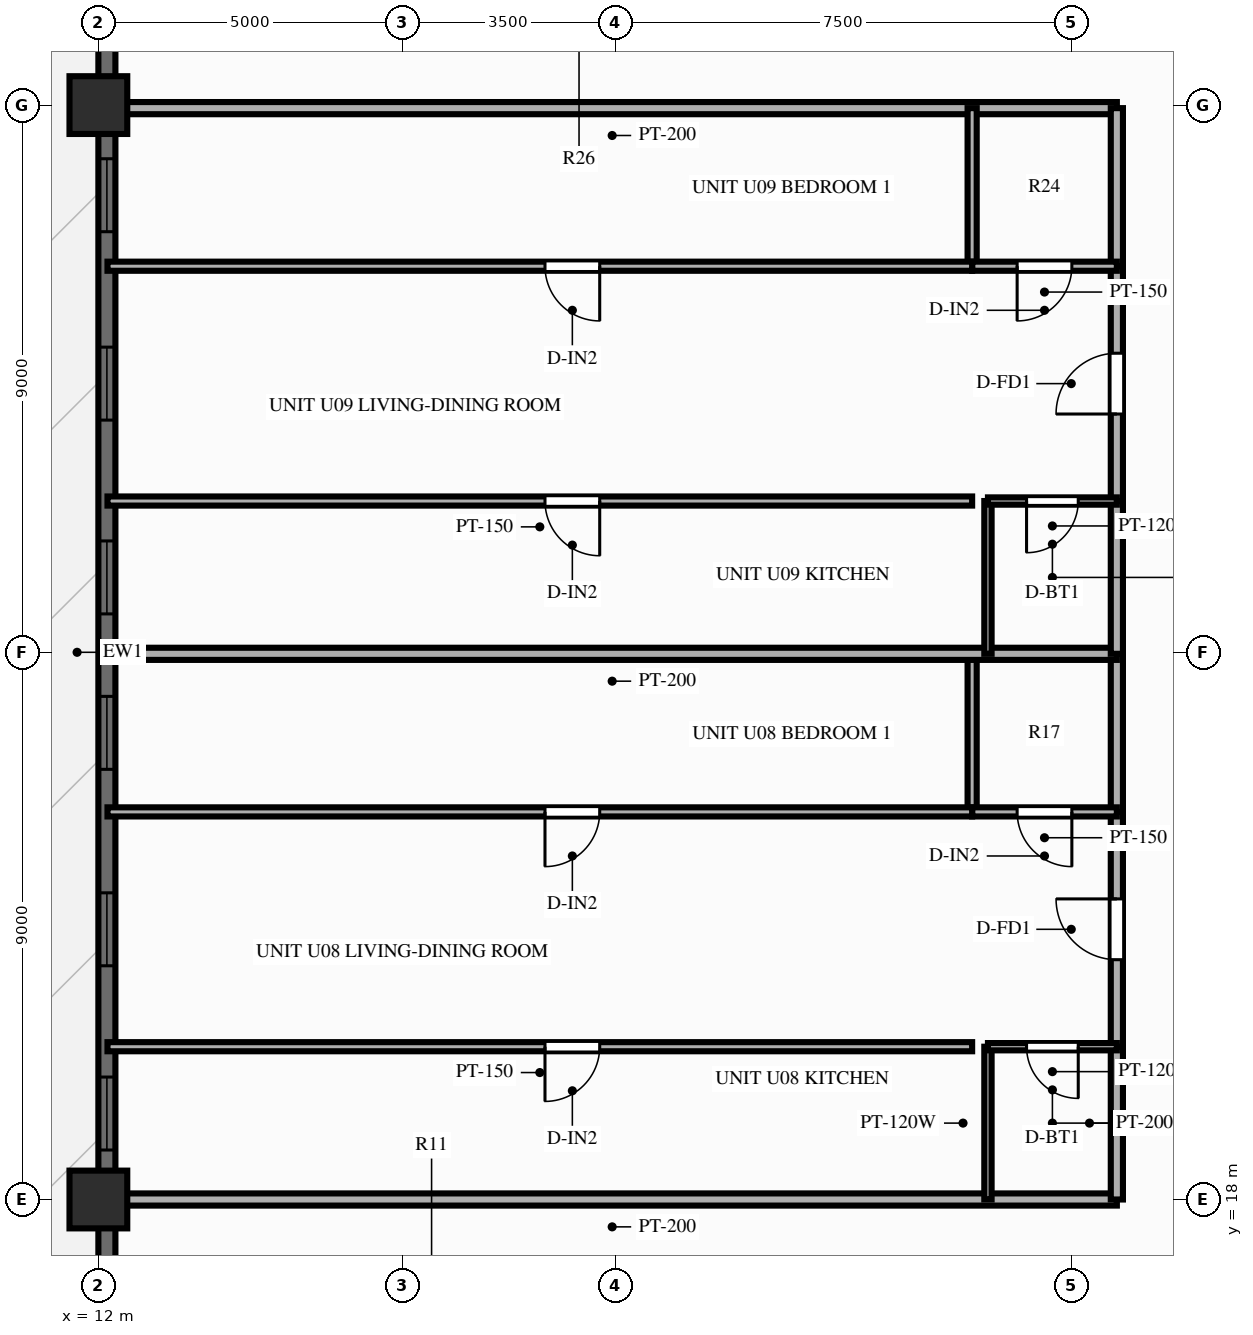
"""IFC4 building model, lengths in metres.
Left out: names, types, materials, properties, quantities, classifications, styles, units other than length and angle.
Written with IfcOpenShell. Run it as: python <this file> out.ifc"""

import sys

from ifc_helpers import new_model, si_unit, direction, frame, frame_2d, origin, origin_2d, place, context, subcontext, project, spatial, rectangle, extrude, source, transform, mapped, element, fill, save


model = new_model("IFC4")
c1 = context("Model", 3, precision=1e-05, world=origin(), true_north=direction((0.0, 1.0)))
c2 = subcontext(c1, "Body", "Model", "MODEL_VIEW")
j1 = project(units=[si_unit("LENGTHUNIT", "METRE"), si_unit("PLANEANGLEUNIT", "RADIAN")], contexts=[c1])
p1 = place(None, origin())
s1 = spatial("IfcSite", under=j1, at=p1, CompositionType="ELEMENT")
p2 = place(p1, origin())
s2 = spatial("IfcBuilding", under=s1, at=p2, CompositionType="ELEMENT")
p3 = place(p2, frame((0.0, 0.0, 77.85)))
s3 = spatial("IfcBuildingStorey", under=s2, at=p3, CompositionType="ELEMENT", Elevation=77.85)
m1 = source(origin(), c2, "Body", "SweptSolid", [
    extrude(rectangle(XDim=0.95, YDim=0.95, at=origin_2d()), origin(), (0.0, 0.0, 1.0), 3.0),
])
for number, where, z_axis, x_axis in (
    (1, (12.0, 36.0, 0.0), (0.0, 0.0, 1.0), (1.0, 0.0, 0.0)),
    (2, (12.0, 18.0, 0.0), (0.0, 0.0, 1.0), (1.0, 0.0, 0.0)),
):
    element("IfcColumn", number, at=place(p3, frame(where, z_axis=z_axis, x_axis=x_axis)), inside=s3, PredefinedType="COLUMN", context=c2, shape_type="MappedRepresentation", body=[
        mapped(m1, transform((0.0, 0.0, 0.0), scale=1.0)),
    ])
p4 = place(p3, frame((12.14, 7.2, 0.0), z_axis=(0.0, 0.0, 1.0), x_axis=(0.0, 1.0, 0.0)))
e3 = element("IfcWall", 3, at=p4, inside=s3, PredefinedType="SOLIDWALL", context=c2, shape_type="SweptSolid", body=[
    extrude(rectangle(XDim=39.6, YDim=0.28, at=frame_2d((19.8, 0.0))), origin(), (0.0, 0.0, 1.0), 2.28),
])
p5 = place(p4, frame((4.6, 0.0, 0.0)))
e4 = element("IfcOpeningElement", 4, at=p5, cuts=e3, PredefinedType="OPENING", context=c2, shape_type="SweptSolid", body=[
    extrude(rectangle(XDim=1.6, YDim=2.15, at=frame_2d((0.8, 1.075))), frame((0.0, 0.152, 0.0), z_axis=(0.0, -1.0, 0.0), x_axis=(1.0, 0.0, 0.0)), (0.0, 0.0, 1.0), 0.304),
])
p6 = place(p4, frame((11.614, 0.0, 0.25)))
e5 = element("IfcOpeningElement", 5, at=p6, cuts=e3, PredefinedType="OPENING", context=c2, shape_type="SweptSolid", body=[
    extrude(rectangle(XDim=1.2, YDim=1.5, at=frame_2d((0.6, 0.75))), frame((0.0, 0.152, 0.0), z_axis=(0.0, -1.0, 0.0), x_axis=(1.0, 0.0, 0.0)), (0.0, 0.0, 1.0), 0.304),
])
p7 = place(p4, frame((14.644, 0.0, 0.25)))
e6 = element("IfcOpeningElement", 6, at=p7, cuts=e3, PredefinedType="OPENING", context=c2, shape_type="SweptSolid", body=[
    extrude(rectangle(XDim=1.2, YDim=1.5, at=frame_2d((0.6, 0.75))), frame((0.0, 0.152, 0.0), z_axis=(0.0, -1.0, 0.0), x_axis=(1.0, 0.0, 0.0)), (0.0, 0.0, 1.0), 0.304),
])
p8 = place(p4, frame((17.875, 0.0, 0.25)))
e7 = element("IfcOpeningElement", 7, at=p8, cuts=e3, PredefinedType="OPENING", context=c2, shape_type="SweptSolid", body=[
    extrude(rectangle(XDim=1.2, YDim=1.5, at=frame_2d((0.6, 0.75))), frame((0.0, 0.152, 0.0), z_axis=(0.0, -1.0, 0.0), x_axis=(1.0, 0.0, 0.0)), (0.0, 0.0, 1.0), 0.304),
])
p9 = place(p4, frame((20.431, 0.0, 0.25)))
e8 = element("IfcOpeningElement", 8, at=p9, cuts=e3, PredefinedType="OPENING", context=c2, shape_type="SweptSolid", body=[
    extrude(rectangle(XDim=1.2, YDim=1.5, at=frame_2d((0.6, 0.75))), frame((0.0, 0.152, 0.0), z_axis=(0.0, -1.0, 0.0), x_axis=(1.0, 0.0, 0.0)), (0.0, 0.0, 1.0), 0.304),
])
p10 = place(p4, frame((23.619, 0.0, 0.25)))
e9 = element("IfcOpeningElement", 9, at=p10, cuts=e3, PredefinedType="OPENING", context=c2, shape_type="SweptSolid", body=[
    extrude(rectangle(XDim=1.2, YDim=1.5, at=frame_2d((0.6, 0.75))), frame((0.0, 0.152, 0.0), z_axis=(0.0, -1.0, 0.0), x_axis=(1.0, 0.0, 0.0)), (0.0, 0.0, 1.0), 0.304),
])
p11 = place(p4, frame((26.718, 0.0, 0.25)))
e10 = element("IfcOpeningElement", 10, at=p11, cuts=e3, PredefinedType="OPENING", context=c2, shape_type="SweptSolid", body=[
    extrude(rectangle(XDim=1.2, YDim=1.5, at=frame_2d((0.6, 0.75))), frame((0.0, 0.152, 0.0), z_axis=(0.0, -1.0, 0.0), x_axis=(1.0, 0.0, 0.0)), (0.0, 0.0, 1.0), 0.304),
])
p12 = place(p4, frame((33.6, 0.0, 0.25)))
e11 = element("IfcOpeningElement", 11, at=p12, cuts=e3, PredefinedType="OPENING", context=c2, shape_type="SweptSolid", body=[
    extrude(rectangle(XDim=1.2, YDim=1.5, at=frame_2d((0.6, 0.75))), frame((0.0, 0.152, 0.0), z_axis=(0.0, -1.0, 0.0), x_axis=(1.0, 0.0, 0.0)), (0.0, 0.0, 1.0), 0.304),
])
for number, where, z_axis, x_axis in (
    (12, (28.75, 18.0, 0.0), (0.0, 0.0, 1.0), (-1.0, 0.0, 0.0)),
    (13, (28.75, 35.95, 0.0), (0.0, 0.0, 1.0), (-1.0, 0.0, 0.0)),
):
    element("IfcWall", number, at=place(p3, frame(where, z_axis=z_axis, x_axis=x_axis)), inside=s3, PredefinedType="PARTITIONING", context=c2, shape_type="SweptSolid", body=[
        extrude(rectangle(XDim=16.6, YDim=0.2, at=frame_2d((8.3, 0.0))), origin(), (0.0, 0.0, 1.0), 2.34),
    ])
p13 = place(p3, frame((28.75, 18.0, 0.0), z_axis=(0.0, 0.0, 1.0), x_axis=(0.0, 1.0, 0.0)))
e14 = element("IfcWall", 14, at=p13, inside=s3, PredefinedType="PARTITIONING", context=c2, shape_type="SweptSolid", body=[
    extrude(rectangle(XDim=2.513, YDim=0.2, at=frame_2d((1.256, 0.0))), origin(), (0.0, 0.0, 1.0), 2.79),
])
p14 = place(p3, frame((28.75, 20.513, 0.0), z_axis=(0.0, 0.0, 1.0), x_axis=(0.0, 1.0, 0.0)))
e15 = element("IfcWall", 15, at=p14, inside=s3, PredefinedType="PARTITIONING", context=c2, shape_type="SweptSolid", body=[
    extrude(rectangle(XDim=3.862, YDim=0.2, at=frame_2d((1.931, 0.0))), origin(), (0.0, 0.0, 1.0), 2.79),
])
p15 = place(p14, frame((1.431, 0.0, 0.0)))
e16 = element("IfcOpeningElement", 16, at=p15, cuts=e15, PredefinedType="OPENING", context=c2, shape_type="SweptSolid", body=[
    extrude(rectangle(XDim=1.0, YDim=2.15, at=frame_2d((0.5, 1.075))), frame((0.0, 0.112, 0.0), z_axis=(0.0, -1.0, 0.0), x_axis=(1.0, 0.0, 0.0)), (0.0, 0.0, 1.0), 0.224),
])
p16 = place(p3, frame((28.75, 24.375, 0.0), z_axis=(0.0, 0.0, 1.0), x_axis=(0.0, 1.0, 0.0)))
e17 = element("IfcWall", 17, at=p16, inside=s3, PredefinedType="PARTITIONING", context=c2, shape_type="SweptSolid", body=[
    extrude(rectangle(XDim=2.6, YDim=0.2, at=frame_2d((1.3, 0.0))), origin(), (0.0, 0.0, 1.0), 2.79),
])
p17 = place(p3, frame((26.63, 18.0, 0.0), z_axis=(0.0, 0.0, 1.0), x_axis=(0.0, 1.0, 0.0)))
e18 = element("IfcWall", 18, at=p17, inside=s3, PredefinedType="PARTITIONING", context=c2, shape_type="SweptSolid", body=[
    extrude(rectangle(XDim=2.513, YDim=0.12, at=frame_2d((1.256, 0.0))), origin(), (0.0, 0.0, 1.0), 2.79),
])
p18 = place(p3, frame((26.37, 24.375, 0.0), z_axis=(0.0, 0.0, 1.0), x_axis=(0.0, 1.0, 0.0)))
e19 = element("IfcWall", 19, at=p18, inside=s3, PredefinedType="PARTITIONING", context=c2, shape_type="SweptSolid", body=[
    extrude(rectangle(XDim=2.6, YDim=0.15, at=frame_2d((1.3, 0.0))), origin(), (0.0, 0.0, 1.0), 2.79),
])
p19 = place(p3, frame((28.75, 20.513, 0.0), z_axis=(0.0, 0.0, 1.0), x_axis=(-1.0, 0.0, 0.0)))
e20 = element("IfcWall", 20, at=p19, inside=s3, PredefinedType="PARTITIONING", context=c2, shape_type="SweptSolid", body=[
    extrude(rectangle(XDim=2.12, YDim=0.12, at=frame_2d((1.06, 0.0))), origin(), (0.0, 0.0, 1.0), 2.79),
])
p20 = place(p19, frame((0.635, 0.0, 0.0)))
e21 = element("IfcOpeningElement", 21, at=p20, cuts=e20, PredefinedType="OPENING", context=c2, shape_type="SweptSolid", body=[
    extrude(rectangle(XDim=0.85, YDim=2.05, at=frame_2d((0.425, 1.025))), frame((0.0, 0.072, 0.0), z_axis=(0.0, -1.0, 0.0), x_axis=(1.0, 0.0, 0.0)), (0.0, 0.0, 1.0), 0.144),
])
p21 = place(p3, frame((26.37, 20.513, 0.0), z_axis=(0.0, 0.0, 1.0), x_axis=(-1.0, 0.0, 0.0)))
e22 = element("IfcWall", 22, at=p21, inside=s3, PredefinedType="PARTITIONING", context=c2, shape_type="SweptSolid", body=[
    extrude(rectangle(XDim=14.22, YDim=0.15, at=frame_2d((7.11, 0.0))), origin(), (0.0, 0.0, 1.0), 2.79),
])
p22 = place(p21, frame((6.125, 0.0, 0.0)))
e23 = element("IfcOpeningElement", 23, at=p22, cuts=e22, PredefinedType="OPENING", context=c2, shape_type="SweptSolid", body=[
    extrude(rectangle(XDim=0.9, YDim=2.1, at=frame_2d((0.45, 1.05))), frame((0.0, 0.087, 0.0), z_axis=(0.0, -1.0, 0.0), x_axis=(1.0, 0.0, 0.0)), (0.0, 0.0, 1.0), 0.174),
])
p23 = place(p3, frame((28.75, 24.375, 0.0), z_axis=(0.0, 0.0, 1.0), x_axis=(-1.0, 0.0, 0.0)))
e24 = element("IfcWall", 24, at=p23, inside=s3, PredefinedType="PARTITIONING", context=c2, shape_type="SweptSolid", body=[
    extrude(rectangle(XDim=2.38, YDim=0.15, at=frame_2d((1.19, 0.0))), origin(), (0.0, 0.0, 1.0), 2.79),
])
p24 = place(p23, frame((0.74, 0.0, 0.0)))
e25 = element("IfcOpeningElement", 25, at=p24, cuts=e24, PredefinedType="OPENING", context=c2, shape_type="SweptSolid", body=[
    extrude(rectangle(XDim=0.9, YDim=2.1, at=frame_2d((0.45, 1.05))), frame((0.0, 0.087, 0.0), z_axis=(0.0, -1.0, 0.0), x_axis=(1.0, 0.0, 0.0)), (0.0, 0.0, 1.0), 0.174),
])
p25 = place(p3, frame((26.37, 24.375, 0.0), z_axis=(0.0, 0.0, 1.0), x_axis=(-1.0, 0.0, 0.0)))
e26 = element("IfcWall", 26, at=p25, inside=s3, PredefinedType="PARTITIONING", context=c2, shape_type="SweptSolid", body=[
    extrude(rectangle(XDim=14.22, YDim=0.15, at=frame_2d((7.11, 0.0))), origin(), (0.0, 0.0, 1.0), 2.79),
])
p26 = place(p25, frame((6.125, 0.0, 0.0)))
e27 = element("IfcOpeningElement", 27, at=p26, cuts=e26, PredefinedType="OPENING", context=c2, shape_type="SweptSolid", body=[
    extrude(rectangle(XDim=0.9, YDim=2.1, at=frame_2d((0.45, 1.05))), frame((0.0, 0.087, 0.0), z_axis=(0.0, -1.0, 0.0), x_axis=(1.0, 0.0, 0.0)), (0.0, 0.0, 1.0), 0.174),
])
p27 = place(p3, frame((28.75, 26.975, 0.0), z_axis=(0.0, 0.0, 1.0), x_axis=(-1.0, 0.0, 0.0)))
e28 = element("IfcWall", 28, at=p27, inside=s3, PredefinedType="PARTITIONING", context=c2, shape_type="SweptSolid", body=[
    extrude(rectangle(XDim=16.6, YDim=0.2, at=frame_2d((8.3, 0.0))), origin(), (0.0, 0.0, 1.0), 2.79),
])
p28 = place(p3, frame((28.75, 26.975, 0.0), z_axis=(0.0, 0.0, 1.0), x_axis=(0.0, 1.0, 0.0)))
e29 = element("IfcWall", 29, at=p28, inside=s3, PredefinedType="PARTITIONING", context=c2, shape_type="SweptSolid", body=[
    extrude(rectangle(XDim=2.513, YDim=0.2, at=frame_2d((1.256, 0.0))), origin(), (0.0, 0.0, 1.0), 2.79),
])
p29 = place(p3, frame((28.75, 29.488, 0.0), z_axis=(0.0, 0.0, 1.0), x_axis=(0.0, 1.0, 0.0)))
e30 = element("IfcWall", 30, at=p29, inside=s3, PredefinedType="PARTITIONING", context=c2, shape_type="SweptSolid", body=[
    extrude(rectangle(XDim=3.862, YDim=0.2, at=frame_2d((1.931, 0.0))), origin(), (0.0, 0.0, 1.0), 2.79),
])
p30 = place(p29, frame((1.431, 0.0, 0.0)))
e31 = element("IfcOpeningElement", 31, at=p30, cuts=e30, PredefinedType="OPENING", context=c2, shape_type="SweptSolid", body=[
    extrude(rectangle(XDim=1.0, YDim=2.15, at=frame_2d((0.5, 1.075))), frame((0.0, 0.112, 0.0), z_axis=(0.0, -1.0, 0.0), x_axis=(1.0, 0.0, 0.0)), (0.0, 0.0, 1.0), 0.224),
])
p31 = place(p3, frame((28.75, 33.35, 0.0), z_axis=(0.0, 0.0, 1.0), x_axis=(0.0, 1.0, 0.0)))
e32 = element("IfcWall", 32, at=p31, inside=s3, PredefinedType="PARTITIONING", context=c2, shape_type="SweptSolid", body=[
    extrude(rectangle(XDim=2.6, YDim=0.2, at=frame_2d((1.3, 0.0))), origin(), (0.0, 0.0, 1.0), 2.79),
])
p32 = place(p3, frame((26.63, 26.975, 0.0), z_axis=(0.0, 0.0, 1.0), x_axis=(0.0, 1.0, 0.0)))
e33 = element("IfcWall", 33, at=p32, inside=s3, PredefinedType="PARTITIONING", context=c2, shape_type="SweptSolid", body=[
    extrude(rectangle(XDim=2.513, YDim=0.12, at=frame_2d((1.256, 0.0))), origin(), (0.0, 0.0, 1.0), 2.79),
])
p33 = place(p3, frame((26.37, 33.35, 0.0), z_axis=(0.0, 0.0, 1.0), x_axis=(0.0, 1.0, 0.0)))
e34 = element("IfcWall", 34, at=p33, inside=s3, PredefinedType="PARTITIONING", context=c2, shape_type="SweptSolid", body=[
    extrude(rectangle(XDim=2.6, YDim=0.15, at=frame_2d((1.3, 0.0))), origin(), (0.0, 0.0, 1.0), 2.79),
])
p34 = place(p3, frame((28.75, 29.488, 0.0), z_axis=(0.0, 0.0, 1.0), x_axis=(-1.0, 0.0, 0.0)))
e35 = element("IfcWall", 35, at=p34, inside=s3, PredefinedType="PARTITIONING", context=c2, shape_type="SweptSolid", body=[
    extrude(rectangle(XDim=2.12, YDim=0.12, at=frame_2d((1.06, 0.0))), origin(), (0.0, 0.0, 1.0), 2.79),
])
p35 = place(p34, frame((0.635, 0.0, 0.0)))
e36 = element("IfcOpeningElement", 36, at=p35, cuts=e35, PredefinedType="OPENING", context=c2, shape_type="SweptSolid", body=[
    extrude(rectangle(XDim=0.85, YDim=2.05, at=frame_2d((0.425, 1.025))), frame((0.0, 0.072, 0.0), z_axis=(0.0, -1.0, 0.0), x_axis=(1.0, 0.0, 0.0)), (0.0, 0.0, 1.0), 0.144),
])
p36 = place(p3, frame((26.37, 29.488, 0.0), z_axis=(0.0, 0.0, 1.0), x_axis=(-1.0, 0.0, 0.0)))
e37 = element("IfcWall", 37, at=p36, inside=s3, PredefinedType="PARTITIONING", context=c2, shape_type="SweptSolid", body=[
    extrude(rectangle(XDim=14.22, YDim=0.15, at=frame_2d((7.11, 0.0))), origin(), (0.0, 0.0, 1.0), 2.79),
])
p37 = place(p36, frame((6.125, 0.0, 0.0)))
e38 = element("IfcOpeningElement", 38, at=p37, cuts=e37, PredefinedType="OPENING", context=c2, shape_type="SweptSolid", body=[
    extrude(rectangle(XDim=0.9, YDim=2.1, at=frame_2d((0.45, 1.05))), frame((0.0, 0.087, 0.0), z_axis=(0.0, -1.0, 0.0), x_axis=(1.0, 0.0, 0.0)), (0.0, 0.0, 1.0), 0.174),
])
p38 = place(p3, frame((28.75, 33.35, 0.0), z_axis=(0.0, 0.0, 1.0), x_axis=(-1.0, 0.0, 0.0)))
e39 = element("IfcWall", 39, at=p38, inside=s3, PredefinedType="PARTITIONING", context=c2, shape_type="SweptSolid", body=[
    extrude(rectangle(XDim=2.38, YDim=0.15, at=frame_2d((1.19, 0.0))), origin(), (0.0, 0.0, 1.0), 2.79),
])
p39 = place(p38, frame((0.74, 0.0, 0.0)))
e40 = element("IfcOpeningElement", 40, at=p39, cuts=e39, PredefinedType="OPENING", context=c2, shape_type="SweptSolid", body=[
    extrude(rectangle(XDim=0.9, YDim=2.1, at=frame_2d((0.45, 1.05))), frame((0.0, 0.087, 0.0), z_axis=(0.0, -1.0, 0.0), x_axis=(1.0, 0.0, 0.0)), (0.0, 0.0, 1.0), 0.174),
])
p40 = place(p3, frame((26.37, 33.35, 0.0), z_axis=(0.0, 0.0, 1.0), x_axis=(-1.0, 0.0, 0.0)))
e41 = element("IfcWall", 41, at=p40, inside=s3, PredefinedType="PARTITIONING", context=c2, shape_type="SweptSolid", body=[
    extrude(rectangle(XDim=14.22, YDim=0.15, at=frame_2d((7.11, 0.0))), origin(), (0.0, 0.0, 1.0), 2.79),
])
p41 = place(p40, frame((6.125, 0.0, 0.0)))
e42 = element("IfcOpeningElement", 42, at=p41, cuts=e41, PredefinedType="OPENING", context=c2, shape_type="SweptSolid", body=[
    extrude(rectangle(XDim=0.9, YDim=2.1, at=frame_2d((0.45, 1.05))), frame((0.0, 0.087, 0.0), z_axis=(0.0, -1.0, 0.0), x_axis=(1.0, 0.0, 0.0)), (0.0, 0.0, 1.0), 0.174),
])
m2 = source(origin(), c2, "Body", "SweptSolid", [
    extrude(rectangle(XDim=1.2, YDim=1.5, at=frame_2d((0.6, 0.75))), frame((0.0, 0.03, 0.0), z_axis=(0.0, -1.0, 0.0), x_axis=(1.0, 0.0, 0.0)), (0.0, 0.0, 1.0), 0.06),
])
p42 = place(p6, origin())
e43 = element("IfcWindow", 43, at=p42, inside=s3, PartitioningType="SINGLE_PANEL", PredefinedType="WINDOW", context=c2, shape_type="MappedRepresentation", body=[
    mapped(m2, transform((0.0, 0.0, 0.0), scale=1.0)),
])
fill(e5, e43)
p43 = place(p7, origin())
e44 = element("IfcWindow", 44, at=p43, inside=s3, PartitioningType="SINGLE_PANEL", PredefinedType="WINDOW", context=c2, shape_type="MappedRepresentation", body=[
    mapped(m2, transform((0.0, 0.0, 0.0), scale=1.0)),
])
fill(e6, e44)
p44 = place(p8, origin())
e45 = element("IfcWindow", 45, at=p44, inside=s3, PartitioningType="SINGLE_PANEL", PredefinedType="WINDOW", context=c2, shape_type="MappedRepresentation", body=[
    mapped(m2, transform((0.0, 0.0, 0.0), scale=1.0)),
])
fill(e7, e45)
p45 = place(p9, origin())
e46 = element("IfcWindow", 46, at=p45, inside=s3, PartitioningType="SINGLE_PANEL", PredefinedType="WINDOW", context=c2, shape_type="MappedRepresentation", body=[
    mapped(m2, transform((0.0, 0.0, 0.0), scale=1.0)),
])
fill(e8, e46)
p46 = place(p10, origin())
e47 = element("IfcWindow", 47, at=p46, inside=s3, PartitioningType="SINGLE_PANEL", PredefinedType="WINDOW", context=c2, shape_type="MappedRepresentation", body=[
    mapped(m2, transform((0.0, 0.0, 0.0), scale=1.0)),
])
fill(e9, e47)
p47 = place(p11, origin())
e48 = element("IfcWindow", 48, at=p47, inside=s3, PartitioningType="SINGLE_PANEL", PredefinedType="WINDOW", context=c2, shape_type="MappedRepresentation", body=[
    mapped(m2, transform((0.0, 0.0, 0.0), scale=1.0)),
])
fill(e10, e48)
m3 = source(origin(), c2, "Body", "SweptSolid", [
    extrude(rectangle(XDim=1.0, YDim=2.15, at=frame_2d((0.5, 1.075))), frame((0.0, 0.025, 0.0), z_axis=(0.0, -1.0, 0.0), x_axis=(1.0, 0.0, 0.0)), (0.0, 0.0, 1.0), 0.05),
])
p48 = place(p15, origin())
e49 = element("IfcDoor", 49, at=p48, inside=s3, OperationType="SINGLE_SWING_RIGHT", PredefinedType="DOOR", context=c2, shape_type="MappedRepresentation", body=[
    mapped(m3, transform((0.0, 0.0, 0.0), scale=1.0)),
])
fill(e16, e49)
m4 = source(origin(), c2, "Body", "SweptSolid", [
    extrude(rectangle(XDim=0.85, YDim=2.05, at=frame_2d((0.425, 1.025))), frame((0.0, 0.025, 0.0), z_axis=(0.0, -1.0, 0.0), x_axis=(1.0, 0.0, 0.0)), (0.0, 0.0, 1.0), 0.05),
])
p49 = place(p20, origin())
e50 = element("IfcDoor", 50, at=p49, inside=s3, OperationType="SINGLE_SWING_LEFT", PredefinedType="DOOR", context=c2, shape_type="MappedRepresentation", body=[
    mapped(m4, transform((0.0, 0.0, 0.0), scale=1.0)),
])
fill(e21, e50)
m5 = source(origin(), c2, "Body", "SweptSolid", [
    extrude(rectangle(XDim=0.9, YDim=2.1, at=frame_2d((0.45, 1.05))), frame((0.0, 0.025, 0.0), z_axis=(0.0, -1.0, 0.0), x_axis=(1.0, 0.0, 0.0)), (0.0, 0.0, 1.0), 0.05),
])
p50 = place(p22, origin())
e51 = element("IfcDoor", 51, at=p50, inside=s3, OperationType="SINGLE_SWING_RIGHT", PredefinedType="DOOR", context=c2, shape_type="MappedRepresentation", body=[
    mapped(m5, transform((0.0, 0.0, 0.0), scale=1.0)),
])
fill(e23, e51)
p51 = place(p24, origin())
e52 = element("IfcDoor", 52, at=p51, inside=s3, OperationType="SINGLE_SWING_LEFT", PredefinedType="DOOR", context=c2, shape_type="MappedRepresentation", body=[
    mapped(m5, transform((0.0, 0.0, 0.0), scale=1.0)),
])
fill(e25, e52)
p52 = place(p26, origin())
e53 = element("IfcDoor", 53, at=p52, inside=s3, OperationType="SINGLE_SWING_RIGHT", PredefinedType="DOOR", context=c2, shape_type="MappedRepresentation", body=[
    mapped(m5, transform((0.0, 0.0, 0.0), scale=1.0)),
])
fill(e27, e53)
p53 = place(p30, origin())
e54 = element("IfcDoor", 54, at=p53, inside=s3, OperationType="SINGLE_SWING_LEFT", PredefinedType="DOOR", context=c2, shape_type="MappedRepresentation", body=[
    mapped(m3, transform((0.0, 0.0, 0.0), scale=1.0)),
])
fill(e31, e54)
p54 = place(p35, origin())
e55 = element("IfcDoor", 55, at=p54, inside=s3, OperationType="SINGLE_SWING_RIGHT", PredefinedType="DOOR", context=c2, shape_type="MappedRepresentation", body=[
    mapped(m4, transform((0.0, 0.0, 0.0), scale=1.0)),
])
fill(e36, e55)
p55 = place(p37, origin())
e56 = element("IfcDoor", 56, at=p55, inside=s3, OperationType="SINGLE_SWING_LEFT", PredefinedType="DOOR", context=c2, shape_type="MappedRepresentation", body=[
    mapped(m5, transform((0.0, 0.0, 0.0), scale=1.0)),
])
fill(e38, e56)
p56 = place(p39, origin())
e57 = element("IfcDoor", 57, at=p56, inside=s3, OperationType="SINGLE_SWING_RIGHT", PredefinedType="DOOR", context=c2, shape_type="MappedRepresentation", body=[
    mapped(m5, transform((0.0, 0.0, 0.0), scale=1.0)),
])
fill(e40, e57)
p57 = place(p41, origin())
e58 = element("IfcDoor", 58, at=p57, inside=s3, OperationType="SINGLE_SWING_LEFT", PredefinedType="DOOR", context=c2, shape_type="MappedRepresentation", body=[
    mapped(m5, transform((0.0, 0.0, 0.0), scale=1.0)),
])
fill(e42, e58)
save(model, sys.argv[1])
